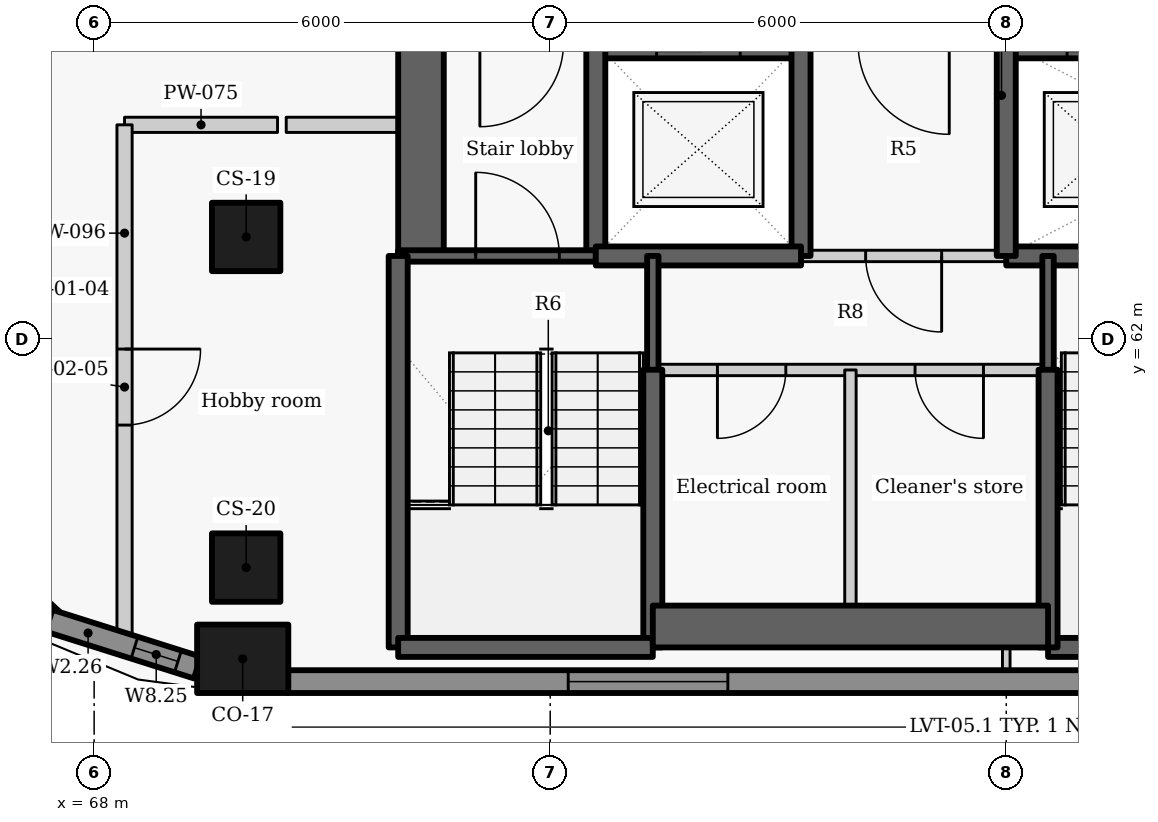
"""IFC4 building model, lengths in metres.
Left out: names, types, materials, properties, quantities, classifications, styles, units other than length and angle.
Written with IfcOpenShell. Run it as: python <this file> out.ifc"""

import sys

from ifc_helpers import new_model, si_unit, direction, frame, frame_2d, origin, origin_2d, place, context, subcontext, project, spatial, rectangle, extrude, element, fill, save


model = new_model("IFC4")
c1 = context("Model", 3, precision=1e-05, world=origin(), true_north=direction((0.0, 1.0)))
c2 = subcontext(c1, "Body", "Model", "MODEL_VIEW")
j1 = project(units=[si_unit("LENGTHUNIT", "METRE"), si_unit("PLANEANGLEUNIT", "RADIAN")], contexts=[c1])
p1 = place(None, origin())
s1 = spatial("IfcSite", under=j1, at=p1, CompositionType="ELEMENT")
p2 = place(p1, origin())
s2 = spatial("IfcBuilding", under=s1, at=p2, CompositionType="ELEMENT")
p3 = place(p2, frame((0.0, 0.0, 193.2)))
s3 = spatial("IfcBuildingStorey", under=s2, at=p3, CompositionType="ELEMENT", Elevation=193.2)
p4 = place(p3, frame((69.955, 57.8, 0.0), z_axis=(0.0, 0.0, 1.0), x_axis=(1.0, 0.0, 0.0)))
e1 = element("IfcColumn", 1, at=p4, inside=s3, PredefinedType="COLUMN", context=c2, shape_type="SweptSolid", body=[
    extrude(rectangle(XDim=1.2, YDim=0.9, at=origin_2d()), origin(), (0.0, 0.0, 1.0), 3.3),
])
for number, where, z_axis, x_axis in (
    (2, (70.0, 63.35, 0.0), (0.0, 0.0, 1.0), (0.0, -1.0, 0.0)),
    (3, (70.0, 59.0, 0.0), (0.0, 0.0, 1.0), (0.0, -1.0, 0.0)),
):
    element("IfcColumn", number, at=place(p3, frame(where, z_axis=z_axis, x_axis=x_axis)), inside=s3, PredefinedType="COLUMN", context=c2, shape_type="SweptSolid", body=[
        extrude(rectangle(XDim=0.9, YDim=0.9, at=origin_2d()), origin(), (0.0, 0.0, 1.0), 3.3),
    ])
p5 = place(p3, frame((66.022, 59.622, 0.0), z_axis=(0.0, 0.0, 1.0), x_axis=(0.734627852992, -0.678470277616, 0.0)))
e4 = element("IfcWall", 4, at=p5, inside=s3, PredefinedType="SOLIDWALL", context=c2, shape_type="SweptSolid", body=[
    extrude(rectangle(XDim=2.026, YDim=0.3, at=frame_2d((1.013, 0.0))), origin(), (0.0, 0.0, 1.0), 2.425),
])
p6 = place(p3, frame((67.406, 58.302, 0.0), z_axis=(0.0, 0.0, 1.0), x_axis=(0.953537608367, -0.301274010545, 0.0)))
e5 = element("IfcWall", 5, at=p6, inside=s3, PredefinedType="SOLIDWALL", context=c2, shape_type="SweptSolid", body=[
    extrude(rectangle(XDim=2.048, YDim=0.3, at=frame_2d((1.024, 0.0))), origin(), (0.0, 0.0, 1.0), 2.425),
])
p7 = place(p6, frame((1.18, 0.0, 0.9)))
e6 = element("IfcOpeningElement", 6, at=p7, cuts=e5, PredefinedType="OPENING", context=c2, shape_type="SweptSolid", body=[
    extrude(rectangle(XDim=0.6, YDim=1.1, at=frame_2d((0.3, 0.55))), frame((0.0, 0.16, 0.0), z_axis=(0.0, -1.0, 0.0), x_axis=(1.0, 0.0, 0.0)), (0.0, 0.0, 1.0), 0.32),
])
p8 = place(p3, frame((70.551, 57.5, 0.0), z_axis=(0.0, 0.0, 1.0), x_axis=(1.0, 0.0, 0.0)))
e7 = element("IfcWall", 7, at=p8, inside=s3, PredefinedType="SOLIDWALL", context=c2, shape_type="SweptSolid", body=[
    extrude(rectangle(XDim=18.893, YDim=0.3, at=frame_2d((9.446, 0.0))), origin(), (0.0, 0.0, 1.0), 2.425),
])
p9 = place(p8, frame((3.687, 0.0, 0.9)))
e8 = element("IfcOpeningElement", 8, at=p9, cuts=e7, PredefinedType="OPENING", context=c2, shape_type="SweptSolid", body=[
    extrude(rectangle(XDim=2.1, YDim=1.1, at=frame_2d((1.05, 0.55))), frame((0.0, 0.16, 0.0), z_axis=(0.0, -1.0, 0.0), x_axis=(1.0, 0.0, 0.0)), (0.0, 0.0, 1.0), 0.32),
])
p10 = place(p8, frame((13.109, 0.0, 0.9)))
e9 = element("IfcOpeningElement", 9, at=p10, cuts=e7, PredefinedType="OPENING", context=c2, shape_type="SweptSolid", body=[
    extrude(rectangle(XDim=2.1, YDim=1.1, at=frame_2d((1.05, 0.55))), frame((0.0, 0.16, 0.0), z_axis=(0.0, -1.0, 0.0), x_axis=(1.0, 0.0, 0.0)), (0.0, 0.0, 1.0), 0.32),
])
p11 = place(p3, frame((72.3, 63.1, -0.275), z_axis=(0.0, 0.0, 1.0), x_axis=(0.0, 1.0, 0.0)))
e10 = element("IfcWall", 10, at=p11, inside=s3, PredefinedType="SHEAR", context=c2, shape_type="SweptSolid", body=[
    extrude(rectangle(XDim=9.1, YDim=0.6, at=frame_2d((4.55, 0.0))), origin(), (0.0, 0.0, 1.0), 3.3),
])
p12 = place(p11, frame((3.748, 0.0, 0.275)))
e11 = element("IfcOpeningElement", 11, at=p12, cuts=e10, PredefinedType="OPENING", context=c2, shape_type="SweptSolid", body=[
    extrude(rectangle(XDim=1.5, YDim=2.1, at=frame_2d((0.75, 1.05))), frame((0.0, 0.31, 0.0), z_axis=(0.0, -1.0, 0.0), x_axis=(1.0, 0.0, 0.0)), (0.0, 0.0, 1.0), 0.62),
])
p13 = place(p3, frame((74.597, 65.9, -0.275), z_axis=(0.0, 0.0, 1.0), x_axis=(1.0, 0.0, 0.0)))
e12 = element("IfcWall", 12, at=p13, inside=s3, PredefinedType="SHEAR", context=c2, shape_type="SweptSolid", body=[
    extrude(rectangle(XDim=2.706, YDim=0.4, at=frame_2d((1.353, 0.0))), origin(), (0.0, 0.0, 1.0), 3.3),
])
p14 = place(p13, frame((0.803, 0.0, 0.275)))
e13 = element("IfcOpeningElement", 13, at=p14, cuts=e12, PredefinedType="OPENING", context=c2, shape_type="SweptSolid", body=[
    extrude(rectangle(XDim=1.1, YDim=2.1, at=frame_2d((0.55, 1.05))), frame((0.0, 0.21, 0.0), z_axis=(0.0, -1.0, 0.0), x_axis=(1.0, 0.0, 0.0)), (0.0, 0.0, 1.0), 0.42),
])
p15 = place(p3, frame((79.997, 65.9, -0.275), z_axis=(0.0, 0.0, 1.0), x_axis=(1.0, 0.0, 0.0)))
e14 = element("IfcWall", 14, at=p15, inside=s3, PredefinedType="SHEAR", context=c2, shape_type="SweptSolid", body=[
    extrude(rectangle(XDim=5.406, YDim=0.4, at=frame_2d((2.703, 0.0))), origin(), (0.0, 0.0, 1.0), 3.3),
])
p16 = place(p15, frame((0.803, 0.0, 0.275)))
e15 = element("IfcOpeningElement", 15, at=p16, cuts=e14, PredefinedType="OPENING", context=c2, shape_type="SweptSolid", body=[
    extrude(rectangle(XDim=1.1, YDim=2.1, at=frame_2d((0.55, 1.05))), frame((0.0, 0.21, 0.0), z_axis=(0.0, -1.0, 0.0), x_axis=(1.0, 0.0, 0.0)), (0.0, 0.0, 1.0), 0.42),
])
p17 = place(p3, frame((74.6, 63.1, -0.275), z_axis=(0.0, 0.0, 1.0), x_axis=(0.0, 1.0, 0.0)))
e16 = element("IfcWall", 16, at=p17, inside=s3, PredefinedType="SHEAR", context=c2, shape_type="SweptSolid", body=[
    extrude(rectangle(XDim=2.8, YDim=0.25, at=frame_2d((1.4, 0.0))), origin(), (0.0, 0.0, 1.0), 3.3),
])
p18 = place(p3, frame((72.0, 63.1, -0.275), z_axis=(0.0, 0.0, 1.0), x_axis=(1.0, 0.0, 0.0)))
e17 = element("IfcWall", 17, at=p18, inside=s3, PredefinedType="SHEAR", context=c2, shape_type="SweptSolid", body=[
    extrude(rectangle(XDim=2.6, YDim=0.15, at=frame_2d((1.3, 0.0))), origin(), (0.0, 0.0, 1.0), 3.3),
])
p19 = place(p18, frame((1.02, 0.0, 0.275)))
e18 = element("IfcOpeningElement", 18, at=p19, cuts=e17, PredefinedType="OPENING", context=c2, shape_type="SweptSolid", body=[
    extrude(rectangle(XDim=1.1, YDim=2.1, at=frame_2d((0.55, 1.05))), frame((0.0, 0.085, 0.0), z_axis=(0.0, -1.0, 0.0), x_axis=(1.0, 0.0, 0.0)), (0.0, 0.0, 1.0), 0.17),
])
p20 = place(p3, frame((77.3, 63.1, -0.275), z_axis=(0.0, 0.0, 1.0), x_axis=(0.0, 1.0, 0.0)))
e19 = element("IfcWall", 19, at=p20, inside=s3, PredefinedType="SHEAR", context=c2, shape_type="SweptSolid", body=[
    extrude(rectangle(XDim=2.8, YDim=0.25, at=frame_2d((1.4, 0.0))), origin(), (0.0, 0.0, 1.0), 3.3),
])
p21 = place(p3, frame((74.6, 63.1, -0.275), z_axis=(0.0, 0.0, 1.0), x_axis=(1.0, 0.0, 0.0)))
e20 = element("IfcWall", 20, at=p21, inside=s3, PredefinedType="SHEAR", context=c2, shape_type="SweptSolid", body=[
    extrude(rectangle(XDim=2.7, YDim=0.25, at=frame_2d((1.35, 0.0))), origin(), (0.0, 0.0, 1.0), 3.3),
])
p22 = place(p3, frame((80.0, 63.1, -0.275), z_axis=(0.0, 0.0, 1.0), x_axis=(1.0, 0.0, 0.0)))
e21 = element("IfcWall", 21, at=p22, inside=s3, PredefinedType="SHEAR", context=c2, shape_type="SweptSolid", body=[
    extrude(rectangle(XDim=8.0, YDim=0.25, at=frame_2d((4.0, 0.0))), origin(), (0.0, 0.0, 1.0), 3.3),
])
p23 = place(p22, frame((3.849, 0.0, 0.275)))
e22 = element("IfcOpeningElement", 22, at=p23, cuts=e21, PredefinedType="OPENING", context=c2, shape_type="SweptSolid", body=[
    extrude(rectangle(XDim=1.1, YDim=2.1, at=frame_2d((0.55, 1.05))), frame((0.0, 0.135, 0.0), z_axis=(0.0, -1.0, 0.0), x_axis=(1.0, 0.0, 0.0)), (0.0, 0.0, 1.0), 0.27),
])
p24 = place(p3, frame((80.0, 63.1, -0.275), z_axis=(0.0, 0.0, 1.0), x_axis=(0.0, 1.0, 0.0)))
e23 = element("IfcWall", 23, at=p24, inside=s3, PredefinedType="SHEAR", context=c2, shape_type="SweptSolid", body=[
    extrude(rectangle(XDim=2.8, YDim=0.25, at=frame_2d((1.4, 0.0))), origin(), (0.0, 0.0, 1.0), 3.3),
])
p25 = place(p3, frame((80.0, 63.1, 0.0), z_axis=(0.0, 0.0, 1.0), x_axis=(-1.0, 0.0, 0.0)))
e24 = element("IfcWall", 24, at=p25, inside=s3, PredefinedType="PARTITIONING", context=c2, shape_type="SweptSolid", body=[
    extrude(rectangle(XDim=2.7, YDim=0.15, at=frame_2d((1.35, 0.0))), origin(), (0.0, 0.0, 1.0), 3.025),
])
p26 = place(p25, frame((0.85, 0.0, 0.0)))
e25 = element("IfcOpeningElement", 25, at=p26, cuts=e24, PredefinedType="OPENING", context=c2, shape_type="SweptSolid", body=[
    extrude(rectangle(XDim=1.0, YDim=2.1, at=frame_2d((0.5, 1.05))), frame((0.0, 0.085, 0.0), z_axis=(0.0, -1.0, 0.0), x_axis=(1.0, 0.0, 0.0)), (0.0, 0.0, 1.0), 0.17),
])
p27 = place(p3, frame((75.35, 61.597, -0.275), z_axis=(0.0, 0.0, 1.0), x_axis=(0.0, 1.0, 0.0)))
e26 = element("IfcWall", 26, at=p27, inside=s3, PredefinedType="SHEAR", context=c2, shape_type="SweptSolid", body=[
    extrude(rectangle(XDim=1.503, YDim=0.15, at=frame_2d((0.751, 0.0))), origin(), (0.0, 0.0, 1.0), 3.3),
])
p28 = place(p3, frame((75.35, 57.95, -0.275), z_axis=(0.0, 0.0, 1.0), x_axis=(0.0, 1.0, 0.0)))
e27 = element("IfcWall", 27, at=p28, inside=s3, PredefinedType="SHEAR", context=c2, shape_type="SweptSolid", body=[
    extrude(rectangle(XDim=3.653, YDim=0.25, at=frame_2d((1.827, 0.0))), origin(), (0.0, 0.0, 1.0), 3.3),
])
p29 = place(p3, frame((72.0, 57.95, -0.275), z_axis=(0.0, 0.0, 1.0), x_axis=(0.0, 1.0, 0.0)))
e28 = element("IfcWall", 28, at=p29, inside=s3, PredefinedType="SHEAR", context=c2, shape_type="SweptSolid", body=[
    extrude(rectangle(XDim=5.15, YDim=0.25, at=frame_2d((2.575, 0.0))), origin(), (0.0, 0.0, 1.0), 3.3),
])
p30 = place(p3, frame((72.0, 57.95, -0.275), z_axis=(0.0, 0.0, 1.0), x_axis=(1.0, 0.0, 0.0)))
e29 = element("IfcWall", 29, at=p30, inside=s3, PredefinedType="SHEAR", context=c2, shape_type="SweptSolid", body=[
    extrude(rectangle(XDim=3.35, YDim=0.25, at=frame_2d((1.675, 0.0))), origin(), (0.0, 0.0, 1.0), 3.3),
])
p31 = place(p3, frame((80.55, 57.95, -0.275), z_axis=(0.0, 0.0, 1.0), x_axis=(1.0, 0.0, 0.0)))
e30 = element("IfcWall", 30, at=p31, inside=s3, PredefinedType="SHEAR", context=c2, shape_type="SweptSolid", body=[
    extrude(rectangle(XDim=2.85, YDim=0.25, at=frame_2d((1.425, 0.0))), origin(), (0.0, 0.0, 1.0), 3.3),
])
p32 = place(p3, frame((80.55, 61.597, -0.275), z_axis=(0.0, 0.0, 1.0), x_axis=(0.0, 1.0, 0.0)))
e31 = element("IfcWall", 31, at=p32, inside=s3, PredefinedType="SHEAR", context=c2, shape_type="SweptSolid", body=[
    extrude(rectangle(XDim=1.503, YDim=0.15, at=frame_2d((0.751, 0.0))), origin(), (0.0, 0.0, 1.0), 3.3),
])
p33 = place(p3, frame((80.55, 57.95, -0.275), z_axis=(0.0, 0.0, 1.0), x_axis=(0.0, 1.0, 0.0)))
e32 = element("IfcWall", 32, at=p33, inside=s3, PredefinedType="SHEAR", context=c2, shape_type="SweptSolid", body=[
    extrude(rectangle(XDim=3.653, YDim=0.25, at=frame_2d((1.827, 0.0))), origin(), (0.0, 0.0, 1.0), 3.3),
])
p34 = place(p3, frame((75.35, 58.225, -0.275), z_axis=(0.0, 0.0, 1.0), x_axis=(1.0, 0.0, 0.0)))
e33 = element("IfcWall", 33, at=p34, inside=s3, PredefinedType="SHEAR", context=c2, shape_type="SweptSolid", body=[
    extrude(rectangle(XDim=5.2, YDim=0.55, at=frame_2d((2.6, 0.0))), origin(), (0.0, 0.0, 1.0), 3.3),
])
p35 = place(p3, frame((80.55, 61.6, 0.0), z_axis=(0.0, 0.0, 1.0), x_axis=(-1.0, 0.0, 0.0)))
e34 = element("IfcWall", 34, at=p35, inside=s3, PredefinedType="PARTITIONING", context=c2, shape_type="SweptSolid", body=[
    extrude(rectangle(XDim=5.2, YDim=0.15, at=frame_2d((2.6, 0.0))), origin(), (0.0, 0.0, 1.0), 3.025),
])
p36 = place(p35, frame((3.45, 0.0, 0.0)))
e35 = element("IfcOpeningElement", 35, at=p36, cuts=e34, PredefinedType="OPENING", context=c2, shape_type="SweptSolid", body=[
    extrude(rectangle(XDim=0.9, YDim=2.1, at=frame_2d((0.45, 1.05))), frame((0.0, 0.085, 0.0), z_axis=(0.0, -1.0, 0.0), x_axis=(1.0, 0.0, 0.0)), (0.0, 0.0, 1.0), 0.17),
])
p37 = place(p35, frame((0.85, 0.0, 0.0)))
e36 = element("IfcOpeningElement", 36, at=p37, cuts=e34, PredefinedType="OPENING", context=c2, shape_type="SweptSolid", body=[
    extrude(rectangle(XDim=0.9, YDim=2.1, at=frame_2d((0.45, 1.05))), frame((0.0, 0.085, 0.0), z_axis=(0.0, -1.0, 0.0), x_axis=(1.0, 0.0, 0.0)), (0.0, 0.0, 1.0), 0.17),
])
p38 = place(p3, frame((77.95, 57.95, 0.0), z_axis=(0.0, 0.0, 1.0), x_axis=(0.0, 1.0, 0.0)))
e37 = element("IfcWall", 37, at=p38, inside=s3, PredefinedType="PARTITIONING", context=c2, shape_type="SweptSolid", body=[
    extrude(rectangle(XDim=3.65, YDim=0.15, at=frame_2d((1.825, 0.0))), origin(), (0.0, 0.0, 1.0), 3.025),
])
p39 = place(p3, frame((68.4, 64.825, 0.0), z_axis=(0.0, 0.0, 1.0), x_axis=(1.0, 0.0, 0.0)))
e38 = element("IfcWall", 38, at=p39, inside=s3, PredefinedType="PARTITIONING", context=c2, shape_type="SweptSolid", body=[
    extrude(rectangle(XDim=2.013, YDim=0.2, at=frame_2d((1.006, 0.0))), origin(), (0.0, 0.0, 1.0), 2.505),
])
p40 = place(p3, frame((70.527, 64.825, 0.0), z_axis=(0.0, 0.0, 1.0), x_axis=(1.0, 0.0, 0.0)))
e39 = element("IfcWall", 39, at=p40, inside=s3, PredefinedType="PARTITIONING", context=c2, shape_type="SweptSolid", body=[
    extrude(rectangle(XDim=1.473, YDim=0.2, at=frame_2d((0.736, 0.0))), origin(), (0.0, 0.0, 1.0), 3.025),
])
p41 = place(p3, frame((68.4, 64.825, 0.0), z_axis=(0.0, 0.0, 1.0), x_axis=(0.0, -1.0, 0.0)))
e40 = element("IfcWall", 40, at=p41, inside=s3, PredefinedType="PARTITIONING", context=c2, shape_type="SweptSolid", body=[
    extrude(rectangle(XDim=6.899, YDim=0.2, at=frame_2d((3.449, 0.0))), origin(), (0.0, 0.0, 1.0), 2.405),
])
p42 = place(p41, frame((2.95, 0.0, 0.0)))
e41 = element("IfcOpeningElement", 41, at=p42, cuts=e40, PredefinedType="OPENING", context=c2, shape_type="SweptSolid", body=[
    extrude(rectangle(XDim=1.0, YDim=2.1, at=frame_2d((0.5, 1.05))), frame((0.0, 0.11, 0.0), z_axis=(0.0, -1.0, 0.0), x_axis=(1.0, 0.0, 0.0)), (0.0, 0.0, 1.0), 0.22),
])
p43 = place(p3, frame((80.0, 57.65, 0.0), z_axis=(0.0, 0.0, 1.0), x_axis=(0.0, 1.0, 0.0)))
e42 = element("IfcWall", 42, at=p43, inside=s3, PredefinedType="PARTITIONING", context=c2, shape_type="SweptSolid", body=[
    extrude(rectangle(XDim=0.3, YDim=0.1, at=frame_2d((0.15, 0.0))), origin(), (0.0, 0.0, 1.0), 3.025),
])
p44 = place(p7, origin())
e43 = element("IfcWindow", 43, at=p44, inside=s3, PartitioningType="SINGLE_PANEL", PredefinedType="WINDOW", context=c2, shape_type="SweptSolid", body=[
    extrude(rectangle(XDim=0.6, YDim=1.1, at=frame_2d((0.3, 0.55))), frame((0.0, 0.03, 0.0), z_axis=(0.0, -1.0, 0.0), x_axis=(1.0, 0.0, 0.0)), (0.0, 0.0, 1.0), 0.06),
])
fill(e6, e43)
p45 = place(p9, origin())
e44 = element("IfcWindow", 44, at=p45, inside=s3, PartitioningType="SINGLE_PANEL", PredefinedType="WINDOW", context=c2, shape_type="SweptSolid", body=[
    extrude(rectangle(XDim=2.1, YDim=1.1, at=frame_2d((1.05, 0.55))), frame((0.0, 0.03, 0.0), z_axis=(0.0, -1.0, 0.0), x_axis=(1.0, 0.0, 0.0)), (0.0, 0.0, 1.0), 0.06),
])
fill(e8, e44)
p46 = place(p26, origin())
e45 = element("IfcDoor", 45, at=p46, inside=s3, OperationType="SINGLE_SWING_LEFT", PredefinedType="DOOR", context=c2, shape_type="SweptSolid", body=[
    extrude(rectangle(XDim=1.0, YDim=2.1, at=frame_2d((0.5, 1.05))), frame((0.0, 0.025, 0.0), z_axis=(0.0, -1.0, 0.0), x_axis=(1.0, 0.0, 0.0)), (0.0, 0.0, 1.0), 0.05),
])
fill(e25, e45)
p47 = place(p36, origin())
e46 = element("IfcDoor", 46, at=p47, inside=s3, OperationType="SINGLE_SWING_RIGHT", PredefinedType="DOOR", context=c2, shape_type="SweptSolid", body=[
    extrude(rectangle(XDim=0.9, YDim=2.1, at=frame_2d((0.45, 1.05))), frame((0.0, 0.025, 0.0), z_axis=(0.0, -1.0, 0.0), x_axis=(1.0, 0.0, 0.0)), (0.0, 0.0, 1.0), 0.05),
])
fill(e35, e46)
p48 = place(p37, origin())
e47 = element("IfcDoor", 47, at=p48, inside=s3, OperationType="SINGLE_SWING_LEFT", PredefinedType="DOOR", context=c2, shape_type="SweptSolid", body=[
    extrude(rectangle(XDim=0.9, YDim=2.1, at=frame_2d((0.45, 1.05))), frame((0.0, 0.025, 0.0), z_axis=(0.0, -1.0, 0.0), x_axis=(1.0, 0.0, 0.0)), (0.0, 0.0, 1.0), 0.05),
])
fill(e36, e47)
p49 = place(p19, origin())
e48 = element("IfcDoor", 48, at=p49, inside=s3, OperationType="SINGLE_SWING_LEFT", PredefinedType="DOOR", context=c2, shape_type="SweptSolid", body=[
    extrude(rectangle(XDim=1.1, YDim=2.1, at=frame_2d((0.55, 1.05))), frame((0.0, 0.025, 0.0), z_axis=(0.0, -1.0, 0.0), x_axis=(1.0, 0.0, 0.0)), (0.0, 0.0, 1.0), 0.05),
])
fill(e18, e48)
p50 = place(p42, origin())
e49 = element("IfcDoor", 49, at=p50, inside=s3, OperationType="SINGLE_SWING_LEFT", PredefinedType="DOOR", context=c2, shape_type="SweptSolid", body=[
    extrude(rectangle(XDim=1.0, YDim=2.1, at=frame_2d((0.5, 1.05))), frame((0.0, 0.025, 0.0), z_axis=(0.0, -1.0, 0.0), x_axis=(1.0, 0.0, 0.0)), (0.0, 0.0, 1.0), 0.05),
])
fill(e41, e49)
save(model, sys.argv[1])
